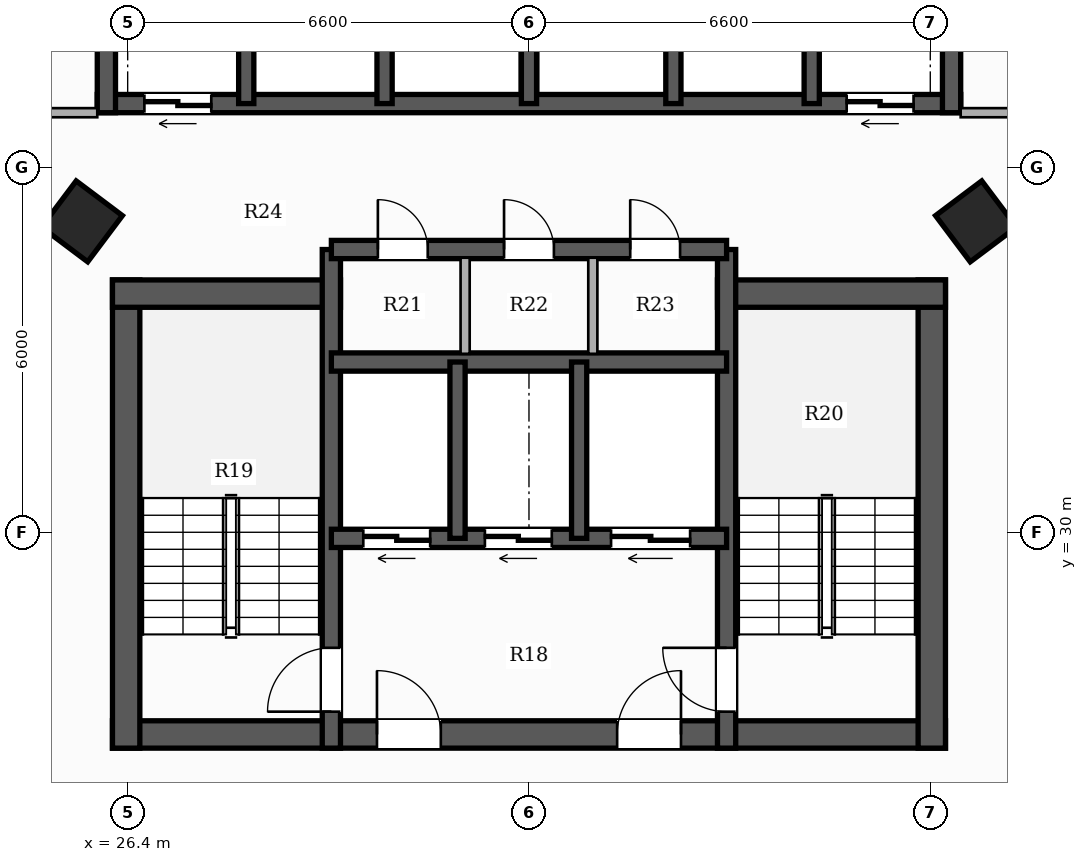
"""IFC4 building model, lengths in metres.
Left out: names, types, materials, properties, quantities, classifications, styles, units other than length and angle.
Written with IfcOpenShell. Run it as: python <this file> out.ifc"""

import sys

from ifc_helpers import new_model, si_unit, direction, frame, frame_2d, origin, origin_2d, place, context, subcontext, project, spatial, rectangle, hollow_rectangle, extrude, element, fill, save


model = new_model("IFC4")
c1 = context("Model", 3, precision=1e-05, world=origin(), true_north=direction((0.0, 1.0)))
c2 = subcontext(c1, "Body", "Model", "MODEL_VIEW")
j1 = project(units=[si_unit("LENGTHUNIT", "METRE"), si_unit("PLANEANGLEUNIT", "RADIAN")], contexts=[c1])
p1 = place(None, origin())
s1 = spatial("IfcSite", under=j1, at=p1, CompositionType="ELEMENT")
p2 = place(p1, origin())
s2 = spatial("IfcBuilding", under=s1, at=p2, CompositionType="ELEMENT")
p3 = place(p2, frame((0.0, 0.0, 90.65)))
s3 = spatial("IfcBuildingStorey", under=s2, at=p3, CompositionType="ELEMENT", Elevation=90.65)
p4 = place(p3, frame((26.15, 26.675, 0.0), z_axis=(0.0, 0.0, 1.0), x_axis=(1.0, 0.0, 0.0)))
e1 = element("IfcWall", 1, at=p4, inside=s3, PredefinedType="SHEAR", context=c2, shape_type="SweptSolid", body=[
    extrude(rectangle(XDim=13.7, YDim=0.45, at=frame_2d((6.85, 0.0))), origin(), (0.0, 0.0, 1.0), 3.3),
])
p5 = place(p4, frame((4.35, 0.0, 0.0)))
e2 = element("IfcOpeningElement", 2, at=p5, cuts=e1, PredefinedType="OPENING", context=c2, shape_type="SweptSolid", body=[
    extrude(rectangle(XDim=1.05, YDim=2.15, at=frame_2d((0.525, 1.075))), frame((0.0, 0.235, 0.0), z_axis=(0.0, -1.0, 0.0), x_axis=(1.0, 0.0, 0.0)), (0.0, 0.0, 1.0), 0.47),
])
p6 = place(p4, frame((8.3, 0.0, 0.0)))
e3 = element("IfcOpeningElement", 3, at=p6, cuts=e1, PredefinedType="OPENING", context=c2, shape_type="SweptSolid", body=[
    extrude(rectangle(XDim=1.05, YDim=2.15, at=frame_2d((0.525, 1.075))), frame((0.0, 0.235, 0.0), z_axis=(0.0, -1.0, 0.0), x_axis=(1.0, 0.0, 0.0)), (0.0, 0.0, 1.0), 0.47),
])
p7 = place(p3, frame((26.375, 26.45, 0.0), z_axis=(0.0, 0.0, 1.0), x_axis=(0.0, 1.0, 0.0)))
e4 = element("IfcWall", 4, at=p7, inside=s3, PredefinedType="SHEAR", context=c2, shape_type="SweptSolid", body=[
    extrude(rectangle(XDim=7.7, YDim=0.45, at=frame_2d((3.85, 0.0))), origin(), (0.0, 0.0, 1.0), 3.3),
])
p8 = place(p3, frame((26.15, 33.925, 0.0), z_axis=(0.0, 0.0, 1.0), x_axis=(1.0, 0.0, 0.0)))
e5 = element("IfcWall", 5, at=p8, inside=s3, PredefinedType="SHEAR", context=c2, shape_type="SweptSolid", body=[
    extrude(rectangle(XDim=3.75, YDim=0.45, at=frame_2d((1.875, 0.0))), origin(), (0.0, 0.0, 1.0), 3.3),
])
p9 = place(p3, frame((39.625, 26.45, 0.0), z_axis=(0.0, 0.0, 1.0), x_axis=(0.0, 1.0, 0.0)))
e6 = element("IfcWall", 6, at=p9, inside=s3, PredefinedType="SHEAR", context=c2, shape_type="SweptSolid", body=[
    extrude(rectangle(XDim=7.7, YDim=0.45, at=frame_2d((3.85, 0.0))), origin(), (0.0, 0.0, 1.0), 3.3),
])
p10 = place(p3, frame((36.1, 33.925, 0.0), z_axis=(0.0, 0.0, 1.0), x_axis=(1.0, 0.0, 0.0)))
e7 = element("IfcWall", 7, at=p10, inside=s3, PredefinedType="SHEAR", context=c2, shape_type="SweptSolid", body=[
    extrude(rectangle(XDim=3.75, YDim=0.45, at=frame_2d((1.875, 0.0))), origin(), (0.0, 0.0, 1.0), 3.3),
])
p11 = place(p3, frame((29.75, 26.45, 0.0), z_axis=(0.0, 0.0, 1.0), x_axis=(0.0, 1.0, 0.0)))
e8 = element("IfcWall", 8, at=p11, inside=s3, PredefinedType="SHEAR", context=c2, shape_type="SweptSolid", body=[
    extrude(rectangle(XDim=8.2, YDim=0.3, at=frame_2d((4.1, 0.0))), origin(), (0.0, 0.0, 1.0), 3.3),
])
p12 = place(p11, frame((0.6, 0.0, 0.0)))
e9 = element("IfcOpeningElement", 9, at=p12, cuts=e8, PredefinedType="OPENING", context=c2, shape_type="SweptSolid", body=[
    extrude(rectangle(XDim=1.05, YDim=2.15, at=frame_2d((0.525, 1.075))), frame((0.0, 0.16, 0.0), z_axis=(0.0, -1.0, 0.0), x_axis=(1.0, 0.0, 0.0)), (0.0, 0.0, 1.0), 0.32),
])
p13 = place(p3, frame((36.25, 26.45, 0.0), z_axis=(0.0, 0.0, 1.0), x_axis=(0.0, 1.0, 0.0)))
e10 = element("IfcWall", 10, at=p13, inside=s3, PredefinedType="SHEAR", context=c2, shape_type="SweptSolid", body=[
    extrude(rectangle(XDim=8.2, YDim=0.3, at=frame_2d((4.1, 0.0))), origin(), (0.0, 0.0, 1.0), 3.3),
])
p14 = place(p13, frame((0.6, 0.0, 0.0)))
e11 = element("IfcOpeningElement", 11, at=p14, cuts=e10, PredefinedType="OPENING", context=c2, shape_type="SweptSolid", body=[
    extrude(rectangle(XDim=1.05, YDim=2.15, at=frame_2d((0.525, 1.075))), frame((0.0, 0.16, 0.0), z_axis=(0.0, -1.0, 0.0), x_axis=(1.0, 0.0, 0.0)), (0.0, 0.0, 1.0), 0.32),
])
p15 = place(p3, frame((36.25, 29.9, 0.0), z_axis=(0.0, 0.0, 1.0), x_axis=(-1.0, 0.0, 0.0)))
e12 = element("IfcWall", 12, at=p15, inside=s3, PredefinedType="SHEAR", context=c2, shape_type="SweptSolid", body=[
    extrude(rectangle(XDim=6.5, YDim=0.3, at=frame_2d((3.25, 0.0))), origin(), (0.0, 0.0, 1.0), 3.3),
])
p16 = place(p15, frame((4.875, 0.0, 0.0)))
e13 = element("IfcOpeningElement", 13, at=p16, cuts=e12, PredefinedType="OPENING", context=c2, shape_type="SweptSolid", body=[
    extrude(rectangle(XDim=1.1, YDim=2.2, at=frame_2d((0.55, 1.1))), frame((0.0, 0.16, 0.0), z_axis=(0.0, -1.0, 0.0), x_axis=(1.0, 0.0, 0.0)), (0.0, 0.0, 1.0), 0.32),
])
p17 = place(p15, frame((2.875, 0.0, 0.0)))
e14 = element("IfcOpeningElement", 14, at=p17, cuts=e12, PredefinedType="OPENING", context=c2, shape_type="SweptSolid", body=[
    extrude(rectangle(XDim=1.1, YDim=2.2, at=frame_2d((0.55, 1.1))), frame((0.0, 0.16, 0.0), z_axis=(0.0, -1.0, 0.0), x_axis=(1.0, 0.0, 0.0)), (0.0, 0.0, 1.0), 0.32),
])
p18 = place(p15, frame((0.6, 0.0, 0.0)))
e15 = element("IfcOpeningElement", 15, at=p18, cuts=e12, PredefinedType="OPENING", context=c2, shape_type="SweptSolid", body=[
    extrude(rectangle(XDim=1.3, YDim=2.2, at=frame_2d((0.65, 1.1))), frame((0.0, 0.16, 0.0), z_axis=(0.0, -1.0, 0.0), x_axis=(1.0, 0.0, 0.0)), (0.0, 0.0, 1.0), 0.32),
])
p19 = place(p3, frame((29.75, 32.8, 0.0), z_axis=(0.0, 0.0, 1.0), x_axis=(1.0, 0.0, 0.0)))
e16 = element("IfcWall", 16, at=p19, inside=s3, PredefinedType="SHEAR", context=c2, shape_type="SweptSolid", body=[
    extrude(rectangle(XDim=6.5, YDim=0.3, at=frame_2d((3.25, 0.0))), origin(), (0.0, 0.0, 1.0), 3.3),
])
for number, where, z_axis, x_axis in (
    (17, (31.825, 29.9, 0.0), (0.0, 0.0, 1.0), (0.0, 1.0, 0.0)),
    (18, (33.825, 29.9, 0.0), (0.0, 0.0, 1.0), (0.0, 1.0, 0.0)),
):
    element("IfcWall", number, at=place(p3, frame(where, z_axis=z_axis, x_axis=x_axis)), inside=s3, PredefinedType="SHEAR", context=c2, shape_type="SweptSolid", body=[
        extrude(rectangle(XDim=2.9, YDim=0.25, at=frame_2d((1.45, 0.0))), origin(), (0.0, 0.0, 1.0), 3.3),
    ])
p20 = place(p3, frame((29.75, 34.65, 0.0), z_axis=(0.0, 0.0, 1.0), x_axis=(1.0, 0.0, 0.0)))
e19 = element("IfcWall", 19, at=p20, inside=s3, PredefinedType="SHEAR", context=c2, shape_type="SweptSolid", body=[
    extrude(rectangle(XDim=6.5, YDim=0.3, at=frame_2d((3.25, 0.0))), origin(), (0.0, 0.0, 1.0), 3.3),
])
p21 = place(p20, frame((0.765, 0.0, 0.0)))
e20 = element("IfcOpeningElement", 20, at=p21, cuts=e19, PredefinedType="OPENING", context=c2, shape_type="SweptSolid", body=[
    extrude(rectangle(XDim=0.82, YDim=2.1, at=frame_2d((0.41, 1.05))), frame((0.0, 0.16, 0.0), z_axis=(0.0, -1.0, 0.0), x_axis=(1.0, 0.0, 0.0)), (0.0, 0.0, 1.0), 0.32),
])
p22 = place(p20, frame((2.84, 0.0, 0.0)))
e21 = element("IfcOpeningElement", 21, at=p22, cuts=e19, PredefinedType="OPENING", context=c2, shape_type="SweptSolid", body=[
    extrude(rectangle(XDim=0.82, YDim=2.1, at=frame_2d((0.41, 1.05))), frame((0.0, 0.16, 0.0), z_axis=(0.0, -1.0, 0.0), x_axis=(1.0, 0.0, 0.0)), (0.0, 0.0, 1.0), 0.32),
])
p23 = place(p20, frame((4.915, 0.0, 0.0)))
e22 = element("IfcOpeningElement", 22, at=p23, cuts=e19, PredefinedType="OPENING", context=c2, shape_type="SweptSolid", body=[
    extrude(rectangle(XDim=0.82, YDim=2.1, at=frame_2d((0.41, 1.05))), frame((0.0, 0.16, 0.0), z_axis=(0.0, -1.0, 0.0), x_axis=(1.0, 0.0, 0.0)), (0.0, 0.0, 1.0), 0.32),
])
p24 = place(p3, frame((40.1, 37.05, 0.0), z_axis=(0.0, 0.0, 1.0), x_axis=(-1.0, 0.0, 0.0)))
e23 = element("IfcWall", 23, at=p24, inside=s3, PredefinedType="SHEAR", context=c2, shape_type="SweptSolid", body=[
    extrude(rectangle(XDim=14.2, YDim=0.3, at=frame_2d((7.1, 0.0))), origin(), (0.0, 0.0, 1.0), 3.3),
])
p25 = place(p24, frame((12.325, 0.0, 0.0)))
e24 = element("IfcOpeningElement", 24, at=p25, cuts=e23, PredefinedType="OPENING", context=c2, shape_type="SweptSolid", body=[
    extrude(rectangle(XDim=1.1, YDim=2.2, at=frame_2d((0.55, 1.1))), frame((0.0, 0.16, 0.0), z_axis=(0.0, -1.0, 0.0), x_axis=(1.0, 0.0, 0.0)), (0.0, 0.0, 1.0), 0.32),
])
p26 = place(p24, frame((0.775, 0.0, 0.0)))
e25 = element("IfcOpeningElement", 25, at=p26, cuts=e23, PredefinedType="OPENING", context=c2, shape_type="SweptSolid", body=[
    extrude(rectangle(XDim=1.1, YDim=2.2, at=frame_2d((0.55, 1.1))), frame((0.0, 0.16, 0.0), z_axis=(0.0, -1.0, 0.0), x_axis=(1.0, 0.0, 0.0)), (0.0, 0.0, 1.0), 0.32),
])
for number, where, z_axis, x_axis in (
    (26, (26.05, 36.9, 0.0), (0.0, 0.0, 1.0), (0.0, 1.0, 0.0)),
    (27, (39.95, 36.9, 0.0), (0.0, 0.0, 1.0), (0.0, 1.0, 0.0)),
):
    element("IfcWall", number, at=place(p3, frame(where, z_axis=z_axis, x_axis=x_axis)), inside=s3, PredefinedType="SHEAR", context=c2, shape_type="SweptSolid", body=[
        extrude(rectangle(XDim=2.85, YDim=0.3, at=frame_2d((1.425, 0.0))), origin(), (0.0, 0.0, 1.0), 3.3),
    ])
for number, where, z_axis, x_axis in (
    (28, (28.35, 37.05, 0.0), (0.0, 0.0, 1.0), (0.0, 1.0, 0.0)),
    (29, (30.625, 37.05, 0.0), (0.0, 0.0, 1.0), (0.0, 1.0, 0.0)),
    (30, (33.0, 37.05, 0.0), (0.0, 0.0, 1.0), (0.0, 1.0, 0.0)),
    (31, (35.375, 37.05, 0.0), (0.0, 0.0, 1.0), (0.0, 1.0, 0.0)),
    (32, (37.65, 37.05, 0.0), (0.0, 0.0, 1.0), (0.0, 1.0, 0.0)),
):
    element("IfcWall", number, at=place(p3, frame(where, z_axis=z_axis, x_axis=x_axis)), inside=s3, PredefinedType="SHEAR", context=c2, shape_type="SweptSolid", body=[
        extrude(rectangle(XDim=2.55, YDim=0.25, at=frame_2d((1.275, 0.0))), origin(), (0.0, 0.0, 1.0), 3.3),
    ])
for number, where, z_axis, x_axis in (
    (33, (25.648, 35.113, 0.0), (0.0, 0.0, 1.0), (0.6, 0.8, 0.0)),
    (34, (40.352, 35.113, 0.0), (0.0, 0.0, 1.0), (-0.6, 0.8, 0.0)),
):
    element("IfcColumn", number, at=place(p3, frame(where, z_axis=z_axis, x_axis=x_axis)), inside=s3, PredefinedType="COLUMN", context=c2, shape_type="SweptSolid", body=[
        extrude(hollow_rectangle(XDim=0.95, YDim=0.95, WallThickness=0.032, at=origin_2d()), origin(), (0.0, 0.0, 1.0), 3.3),
    ])
for number, where, z_axis, x_axis in (
    (35, (31.95, 32.935, 0.0), (0.0, 0.0, 1.0), (0.0, 1.0, 0.0)),
    (36, (34.05, 32.935, 0.0), (0.0, 0.0, 1.0), (0.0, 1.0, 0.0)),
):
    element("IfcWall", number, at=place(p3, frame(where, z_axis=z_axis, x_axis=x_axis)), inside=s3, PredefinedType="PARTITIONING", context=c2, shape_type="SweptSolid", body=[
        extrude(rectangle(XDim=1.58, YDim=0.15, at=frame_2d((0.79, 0.0))), origin(), (0.0, 0.0, 1.0), 3.06),
    ])
p27 = place(p3, frame((40.1, 36.9, 0.0), z_axis=(0.0, 0.0, 1.0), x_axis=(1.0, 0.0, 0.0)))
e37 = element("IfcWall", 37, at=p27, inside=s3, PredefinedType="PARTITIONING", context=c2, shape_type="SweptSolid", body=[
    extrude(rectangle(XDim=2.55, YDim=0.15, at=frame_2d((1.275, 0.0))), origin(), (0.0, 0.0, 1.0), 2.413),
])
p28 = place(p3, frame((23.41, 36.9, 0.0), z_axis=(0.0, 0.0, 1.0), x_axis=(1.0, 0.0, 0.0)))
e38 = element("IfcWall", 38, at=p28, inside=s3, PredefinedType="PARTITIONING", context=c2, shape_type="SweptSolid", body=[
    extrude(rectangle(XDim=2.49, YDim=0.15, at=frame_2d((1.245, 0.0))), origin(), (0.0, 0.0, 1.0), 2.413),
])
p29 = place(p12, origin())
e39 = element("IfcDoor", 39, at=p29, inside=s3, OperationType="SINGLE_SWING_LEFT", PredefinedType="DOOR", context=c2, shape_type="SweptSolid", body=[
    extrude(rectangle(XDim=1.05, YDim=2.15, at=frame_2d((0.525, 1.075))), frame((0.0, 0.025, 0.0), z_axis=(0.0, -1.0, 0.0), x_axis=(1.0, 0.0, 0.0)), (0.0, 0.0, 1.0), 0.05),
])
fill(e9, e39)
p30 = place(p14, origin())
e40 = element("IfcDoor", 40, at=p30, inside=s3, OperationType="SINGLE_SWING_RIGHT", PredefinedType="DOOR", context=c2, shape_type="SweptSolid", body=[
    extrude(rectangle(XDim=1.05, YDim=2.15, at=frame_2d((0.525, 1.075))), frame((0.0, 0.025, 0.0), z_axis=(0.0, -1.0, 0.0), x_axis=(1.0, 0.0, 0.0)), (0.0, 0.0, 1.0), 0.05),
])
fill(e11, e40)
p31 = place(p5, origin())
e41 = element("IfcDoor", 41, at=p31, inside=s3, OperationType="SINGLE_SWING_LEFT", PredefinedType="DOOR", context=c2, shape_type="SweptSolid", body=[
    extrude(rectangle(XDim=1.05, YDim=2.15, at=frame_2d((0.525, 1.075))), frame((0.0, 0.025, 0.0), z_axis=(0.0, -1.0, 0.0), x_axis=(1.0, 0.0, 0.0)), (0.0, 0.0, 1.0), 0.05),
])
fill(e2, e41)
p32 = place(p6, origin())
e42 = element("IfcDoor", 42, at=p32, inside=s3, OperationType="SINGLE_SWING_RIGHT", PredefinedType="DOOR", context=c2, shape_type="SweptSolid", body=[
    extrude(rectangle(XDim=1.05, YDim=2.15, at=frame_2d((0.525, 1.075))), frame((0.0, 0.025, 0.0), z_axis=(0.0, -1.0, 0.0), x_axis=(1.0, 0.0, 0.0)), (0.0, 0.0, 1.0), 0.05),
])
fill(e3, e42)
p33 = place(p16, origin())
e43 = element("IfcDoor", 43, at=p33, inside=s3, OperationType="DOUBLE_DOOR_SLIDING", PredefinedType="DOOR", context=c2, shape_type="SweptSolid", body=[
    extrude(rectangle(XDim=1.1, YDim=2.2, at=frame_2d((0.55, 1.1))), frame((0.0, 0.025, 0.0), z_axis=(0.0, -1.0, 0.0), x_axis=(1.0, 0.0, 0.0)), (0.0, 0.0, 1.0), 0.05),
])
fill(e13, e43)
p34 = place(p17, origin())
e44 = element("IfcDoor", 44, at=p34, inside=s3, OperationType="DOUBLE_DOOR_SLIDING", PredefinedType="DOOR", context=c2, shape_type="SweptSolid", body=[
    extrude(rectangle(XDim=1.1, YDim=2.2, at=frame_2d((0.55, 1.1))), frame((0.0, 0.025, 0.0), z_axis=(0.0, -1.0, 0.0), x_axis=(1.0, 0.0, 0.0)), (0.0, 0.0, 1.0), 0.05),
])
fill(e14, e44)
p35 = place(p18, origin())
e45 = element("IfcDoor", 45, at=p35, inside=s3, OperationType="DOUBLE_DOOR_SLIDING", PredefinedType="DOOR", context=c2, shape_type="SweptSolid", body=[
    extrude(rectangle(XDim=1.3, YDim=2.2, at=frame_2d((0.65, 1.1))), frame((0.0, 0.025, 0.0), z_axis=(0.0, -1.0, 0.0), x_axis=(1.0, 0.0, 0.0)), (0.0, 0.0, 1.0), 0.05),
])
fill(e15, e45)
p36 = place(p25, origin())
e46 = element("IfcDoor", 46, at=p36, inside=s3, OperationType="DOUBLE_DOOR_SLIDING", PredefinedType="DOOR", context=c2, shape_type="SweptSolid", body=[
    extrude(rectangle(XDim=1.1, YDim=2.2, at=frame_2d((0.55, 1.1))), frame((0.0, 0.025, 0.0), z_axis=(0.0, -1.0, 0.0), x_axis=(1.0, 0.0, 0.0)), (0.0, 0.0, 1.0), 0.05),
])
fill(e24, e46)
p37 = place(p26, origin())
e47 = element("IfcDoor", 47, at=p37, inside=s3, OperationType="DOUBLE_DOOR_SLIDING", PredefinedType="DOOR", context=c2, shape_type="SweptSolid", body=[
    extrude(rectangle(XDim=1.1, YDim=2.2, at=frame_2d((0.55, 1.1))), frame((0.0, 0.025, 0.0), z_axis=(0.0, -1.0, 0.0), x_axis=(1.0, 0.0, 0.0)), (0.0, 0.0, 1.0), 0.05),
])
fill(e25, e47)
p38 = place(p21, origin())
e48 = element("IfcDoor", 48, at=p38, inside=s3, OperationType="SINGLE_SWING_LEFT", PredefinedType="DOOR", context=c2, shape_type="SweptSolid", body=[
    extrude(rectangle(XDim=0.82, YDim=2.1, at=frame_2d((0.41, 1.05))), frame((0.0, 0.025, 0.0), z_axis=(0.0, -1.0, 0.0), x_axis=(1.0, 0.0, 0.0)), (0.0, 0.0, 1.0), 0.05),
])
fill(e20, e48)
p39 = place(p22, origin())
e49 = element("IfcDoor", 49, at=p39, inside=s3, OperationType="SINGLE_SWING_LEFT", PredefinedType="DOOR", context=c2, shape_type="SweptSolid", body=[
    extrude(rectangle(XDim=0.82, YDim=2.1, at=frame_2d((0.41, 1.05))), frame((0.0, 0.025, 0.0), z_axis=(0.0, -1.0, 0.0), x_axis=(1.0, 0.0, 0.0)), (0.0, 0.0, 1.0), 0.05),
])
fill(e21, e49)
p40 = place(p23, origin())
e50 = element("IfcDoor", 50, at=p40, inside=s3, OperationType="SINGLE_SWING_LEFT", PredefinedType="DOOR", context=c2, shape_type="SweptSolid", body=[
    extrude(rectangle(XDim=0.82, YDim=2.1, at=frame_2d((0.41, 1.05))), frame((0.0, 0.025, 0.0), z_axis=(0.0, -1.0, 0.0), x_axis=(1.0, 0.0, 0.0)), (0.0, 0.0, 1.0), 0.05),
])
fill(e22, e50)
save(model, sys.argv[1])
